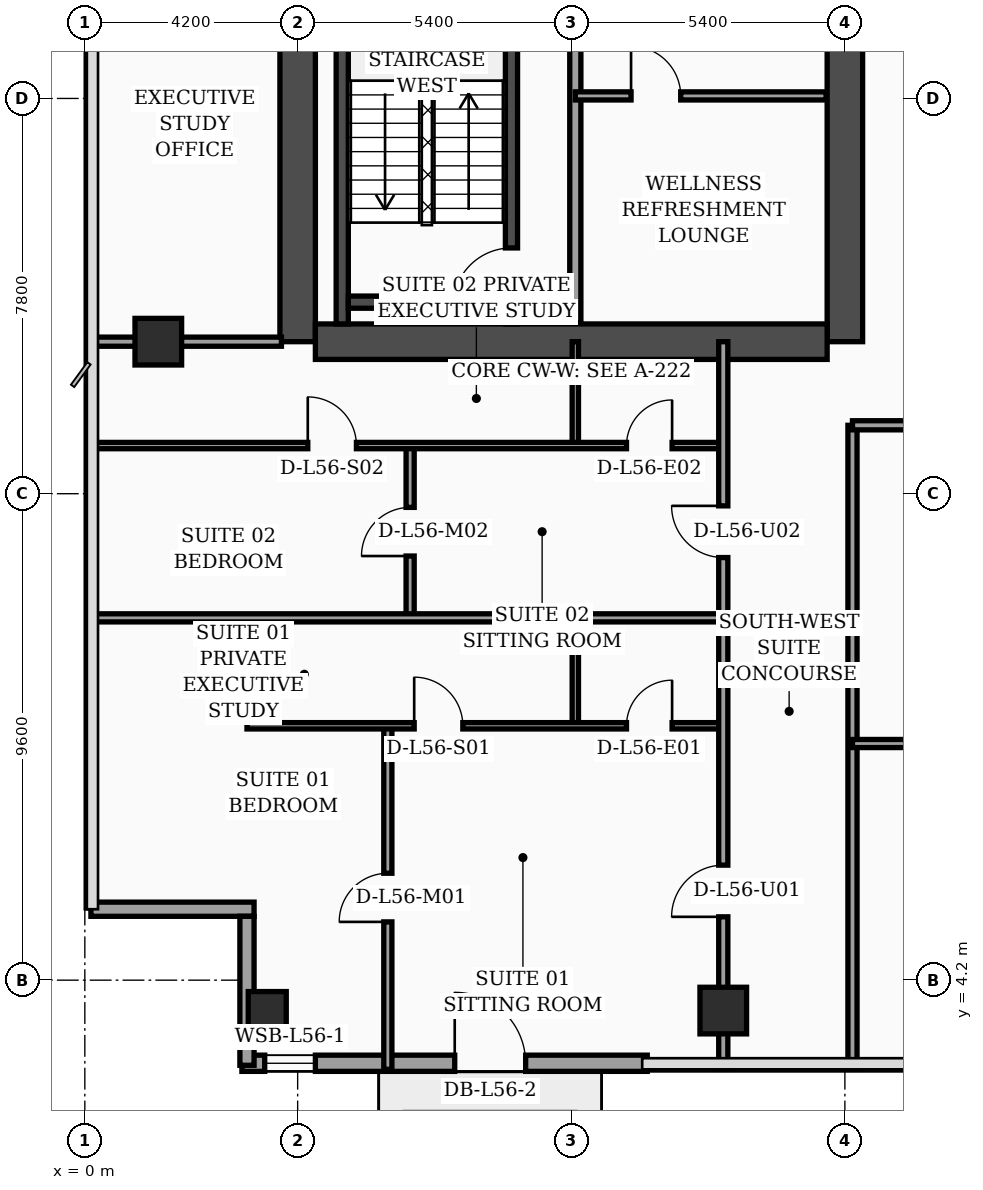
"""IFC4 building model, lengths in metres.
Left out: names, types, materials, properties, quantities, classifications, styles, units other than length and angle.
Written with IfcOpenShell. Run it as: python <this file> out.ifc"""

import sys

from ifc_helpers import new_model, si_unit, direction, frame, frame_2d, origin, origin_2d, place, context, subcontext, project, spatial, rectangle, hollow_rectangle, extrude, element, fill, save


model = new_model("IFC4")
c1 = context("Model", 3, precision=1e-05, world=origin(), true_north=direction((0.0, 1.0)))
c2 = subcontext(c1, "Body", "Model", "MODEL_VIEW")
j1 = project(units=[si_unit("LENGTHUNIT", "METRE"), si_unit("PLANEANGLEUNIT", "RADIAN")], contexts=[c1])
p1 = place(None, origin())
s1 = spatial("IfcSite", under=j1, at=p1, CompositionType="ELEMENT")
p2 = place(p1, origin())
s2 = spatial("IfcBuilding", under=s1, at=p2, CompositionType="ELEMENT")
p3 = place(p2, frame((0.0, 0.0, 226.9)))
s3 = spatial("IfcBuildingStorey", under=s2, at=p3, CompositionType="ELEMENT", Elevation=226.9)
p4 = place(p3, frame((4.2, 16.8, 0.0), z_axis=(0.0, 0.0, 1.0), x_axis=(0.0, 1.0, 0.0)))
e1 = element("IfcWall", 1, at=p4, inside=s3, PredefinedType="SHEAR", context=c2, shape_type="SweptSolid", body=[
    extrude(rectangle(XDim=21.6, YDim=0.7, at=frame_2d((10.8, 0.0))), origin(), (0.0, 0.0, 1.0), 3.56),
])
p5 = place(p3, frame((15.0, 16.8, 0.0), z_axis=(0.0, 0.0, 1.0), x_axis=(0.0, 1.0, 0.0)))
e2 = element("IfcWall", 2, at=p5, inside=s3, PredefinedType="SHEAR", context=c2, shape_type="SweptSolid", body=[
    extrude(rectangle(XDim=21.6, YDim=0.7, at=frame_2d((10.8, 0.0))), origin(), (0.0, 0.0, 1.0), 3.56),
])
p6 = place(p5, frame((8.65, 0.0, 0.0)))
e3 = element("IfcOpeningElement", 3, at=p6, cuts=e2, PredefinedType="OPENING", context=c2, shape_type="SweptSolid", body=[
    extrude(rectangle(XDim=1.1, YDim=2.2, at=frame_2d((0.55, 1.1))), frame((0.0, 0.36, 0.0), z_axis=(0.0, -1.0, 0.0), x_axis=(1.0, 0.0, 0.0)), (0.0, 0.0, 1.0), 0.72),
])
p7 = place(p5, frame((10.85, 0.0, 0.0)))
e4 = element("IfcOpeningElement", 4, at=p7, cuts=e2, PredefinedType="OPENING", context=c2, shape_type="SweptSolid", body=[
    extrude(rectangle(XDim=1.1, YDim=2.2, at=frame_2d((0.55, 1.1))), frame((0.0, 0.36, 0.0), z_axis=(0.0, -1.0, 0.0), x_axis=(1.0, 0.0, 0.0)), (0.0, 0.0, 1.0), 0.72),
])
p8 = place(p5, frame((13.5, 0.0, 0.0)))
e5 = element("IfcOpeningElement", 5, at=p8, cuts=e2, PredefinedType="OPENING", context=c2, shape_type="SweptSolid", body=[
    extrude(rectangle(XDim=1.1, YDim=2.2, at=frame_2d((0.55, 1.1))), frame((0.0, 0.36, 0.0), z_axis=(0.0, -1.0, 0.0), x_axis=(1.0, 0.0, 0.0)), (0.0, 0.0, 1.0), 0.72),
])
p9 = place(p5, frame((16.15, 0.0, 0.0)))
e6 = element("IfcOpeningElement", 6, at=p9, cuts=e2, PredefinedType="OPENING", context=c2, shape_type="SweptSolid", body=[
    extrude(rectangle(XDim=1.1, YDim=2.2, at=frame_2d((0.55, 1.1))), frame((0.0, 0.36, 0.0), z_axis=(0.0, -1.0, 0.0), x_axis=(1.0, 0.0, 0.0)), (0.0, 0.0, 1.0), 0.72),
])
p10 = place(p3, frame((4.55, 16.8, 0.0), z_axis=(0.0, 0.0, 1.0), x_axis=(1.0, 0.0, 0.0)))
e7 = element("IfcWall", 7, at=p10, inside=s3, PredefinedType="SHEAR", context=c2, shape_type="SweptSolid", body=[
    extrude(rectangle(XDim=10.1, YDim=0.7, at=frame_2d((5.05, 0.0))), origin(), (0.0, 0.0, 1.0), 3.56),
])
p11 = place(p3, frame((5.08, 17.15, 0.0), z_axis=(0.0, 0.0, 1.0), x_axis=(0.0, 1.0, 0.0)))
e8 = element("IfcWall", 8, at=p11, inside=s3, PredefinedType="SOLIDWALL", context=c2, shape_type="SweptSolid", body=[
    extrude(rectangle(XDim=9.64, YDim=0.24, at=frame_2d((4.82, 0.0))), origin(), (0.0, 0.0, 1.0), 3.56),
])
p12 = place(p3, frame((8.42, 17.15, 0.0), z_axis=(0.0, 0.0, 1.0), x_axis=(0.0, 1.0, 0.0)))
e9 = element("IfcWall", 9, at=p12, inside=s3, PredefinedType="SOLIDWALL", context=c2, shape_type="SweptSolid", body=[
    extrude(rectangle(XDim=9.64, YDim=0.24, at=frame_2d((4.82, 0.0))), origin(), (0.0, 0.0, 1.0), 3.56),
])
p13 = place(p12, frame((0.35, 0.0, 0.0)))
e10 = element("IfcOpeningElement", 10, at=p13, cuts=e9, PredefinedType="OPENING", context=c2, shape_type="SweptSolid", body=[
    extrude(rectangle(XDim=1.15, YDim=2.2, at=frame_2d((0.575, 1.1))), frame((0.0, 0.13, 0.0), z_axis=(0.0, -1.0, 0.0), x_axis=(1.0, 0.0, 0.0)), (0.0, 0.0, 1.0), 0.26),
])
p14 = place(p3, frame((5.2, 17.58, 0.0), z_axis=(0.0, 0.0, 1.0), x_axis=(1.0, 0.0, 0.0)))
e11 = element("IfcWall", 11, at=p14, inside=s3, PredefinedType="SOLIDWALL", context=c2, shape_type="SweptSolid", body=[
    extrude(rectangle(XDim=3.1, YDim=0.24, at=frame_2d((1.55, 0.0))), origin(), (0.0, 0.0, 1.0), 3.56),
])
p15 = place(p3, frame((3.6, 3.6, 0.0), z_axis=(0.0, 0.0, 1.0), x_axis=(1.0, 0.0, 0.0)))
e12 = element("IfcColumn", 12, at=p15, inside=s3, PredefinedType="COLUMN", context=c2, shape_type="SweptSolid", body=[
    extrude(hollow_rectangle(XDim=0.75, YDim=0.75, WallThickness=0.032, at=origin_2d()), origin(), (0.0, 0.0, 1.0), 3.56),
])
for number, where, z_axis, x_axis in (
    (13, (1.45, 16.8, 0.0), (0.0, 0.0, 1.0), (1.0, 0.0, 0.0)),
    (14, (12.6, 3.6, 0.0), (0.0, 0.0, 1.0), (1.0, 0.0, 0.0)),
):
    element("IfcColumn", number, at=place(p3, frame(where, z_axis=z_axis, x_axis=x_axis)), inside=s3, PredefinedType="COLUMN", context=c2, shape_type="SweptSolid", body=[
        extrude(rectangle(XDim=0.92, YDim=0.92, at=origin_2d()), origin(), (0.0, 0.0, 1.0), 3.56),
    ])
p16 = place(p3, frame((3.1, 2.56, 0.0), z_axis=(0.0, 0.0, 1.0), x_axis=(1.0, 0.0, 0.0)))
e15 = element("IfcWall", 15, at=p16, inside=s3, PredefinedType="SOLIDWALL", context=c2, shape_type="SweptSolid", body=[
    extrude(rectangle(XDim=8.0, YDim=0.32, at=frame_2d((4.0, 0.0))), origin(), (0.0, 0.0, 1.0), 3.56),
])
p17 = place(p16, frame((0.45, 0.0, 0.75)))
e16 = element("IfcOpeningElement", 16, at=p17, cuts=e15, PredefinedType="OPENING", context=c2, shape_type="SweptSolid", body=[
    extrude(rectangle(XDim=1.0, YDim=1.6, at=frame_2d((0.5, 0.8))), frame((0.0, 0.17, 0.0), z_axis=(0.0, -1.0, 0.0), x_axis=(1.0, 0.0, 0.0)), (0.0, 0.0, 1.0), 0.34),
])
p18 = place(p16, frame((4.2, 0.0, 0.0)))
e17 = element("IfcOpeningElement", 17, at=p18, cuts=e15, PredefinedType="OPENING", context=c2, shape_type="SweptSolid", body=[
    extrude(rectangle(XDim=1.4, YDim=2.25, at=frame_2d((0.7, 1.125))), frame((0.0, 0.17, 0.0), z_axis=(0.0, -1.0, 0.0), x_axis=(1.0, 0.0, 0.0)), (0.0, 0.0, 1.0), 0.34),
])
p19 = place(p3, frame((0.12, 5.6, 0.0), z_axis=(0.0, 0.0, 1.0), x_axis=(1.0, 0.0, 0.0)))
e18 = element("IfcWall", 18, at=p19, inside=s3, PredefinedType="SOLIDWALL", context=c2, shape_type="SweptSolid", body=[
    extrude(rectangle(XDim=3.22, YDim=0.28, at=frame_2d((1.61, 0.0))), origin(), (0.0, 0.0, 1.0), 2.94),
])
p20 = place(p3, frame((3.2, 5.46, 0.0), z_axis=(0.0, 0.0, 1.0), x_axis=(0.0, -1.0, 0.0)))
e19 = element("IfcWall", 19, at=p20, inside=s3, PredefinedType="SOLIDWALL", context=c2, shape_type="SweptSolid", body=[
    extrude(rectangle(XDim=2.94, YDim=0.28, at=frame_2d((1.47, 0.0))), origin(), (0.0, 0.0, 1.0), 2.94),
])
p21 = place(p3, frame((9.68, 17.17, 0.0), z_axis=(0.0, 0.0, 1.0), x_axis=(0.0, 1.0, 0.0)))
e20 = element("IfcWall", 20, at=p21, inside=s3, PredefinedType="SOLIDWALL", context=c2, shape_type="SweptSolid", body=[
    extrude(rectangle(XDim=7.83, YDim=0.22, at=frame_2d((3.915, 0.0))), origin(), (0.0, 0.0, 1.0), 3.56),
])
p22 = place(p3, frame((9.68, 21.65, 0.0), z_axis=(0.0, 0.0, 1.0), x_axis=(1.0, 0.0, 0.0)))
e21 = element("IfcWall", 21, at=p22, inside=s3, PredefinedType="PARTITIONING", context=c2, shape_type="SweptSolid", body=[
    extrude(rectangle(XDim=4.95, YDim=0.16, at=frame_2d((2.475, 0.0))), origin(), (0.0, 0.0, 1.0), 3.09),
])
p23 = place(p22, frame((1.1, 0.0, 0.0)))
e22 = element("IfcOpeningElement", 22, at=p23, cuts=e21, PredefinedType="OPENING", context=c2, shape_type="SweptSolid", body=[
    extrude(rectangle(XDim=0.98, YDim=2.15, at=frame_2d((0.49, 1.075))), frame((0.0, 0.09, 0.0), z_axis=(0.0, -1.0, 0.0), x_axis=(1.0, 0.0, 0.0)), (0.0, 0.0, 1.0), 0.18),
])
p24 = place(p3, frame((0.08, 16.8, 0.0), z_axis=(0.0, 0.0, 1.0), x_axis=(1.0, 0.0, 0.0)))
e23 = element("IfcWall", 23, at=p24, inside=s3, PredefinedType="PARTITIONING", context=c2, shape_type="SweptSolid", body=[
    extrude(rectangle(XDim=3.8, YDim=0.18, at=frame_2d((1.9, 0.0))), origin(), (0.0, 0.0, 1.0), 2.94),
])
p25 = place(p3, frame((9.68, 9.22, 0.0), z_axis=(0.0, 0.0, 1.0), x_axis=(0.0, 1.0, 0.0)))
e24 = element("IfcWall", 24, at=p25, inside=s3, PredefinedType="PARTITIONING", context=c2, shape_type="SweptSolid", body=[
    extrude(rectangle(XDim=2.13, YDim=0.125, at=frame_2d((1.065, 0.0))), origin(), (0.0, 0.0, 1.0), 3.09),
])
p26 = place(p3, frame((5.98, 2.44, 0.0), z_axis=(0.0, 0.0, 1.0), x_axis=(0.0, 1.0, 0.0)))
e25 = element("IfcWall", 25, at=p26, inside=s3, PredefinedType="PARTITIONING", context=c2, shape_type="SweptSolid", body=[
    extrude(rectangle(XDim=6.78, YDim=0.16, at=frame_2d((3.39, 0.0))), origin(), (0.0, 0.0, 1.0), 3.09),
])
p27 = place(p26, frame((2.91, 0.0, 0.0)))
e26 = element("IfcOpeningElement", 26, at=p27, cuts=e25, PredefinedType="OPENING", context=c2, shape_type="SweptSolid", body=[
    extrude(rectangle(XDim=0.96, YDim=2.2, at=frame_2d((0.48, 1.1))), frame((0.0, 0.09, 0.0), z_axis=(0.0, -1.0, 0.0), x_axis=(1.0, 0.0, 0.0)), (0.0, 0.0, 1.0), 0.18),
])
p28 = place(p3, frame((3.2, 9.22, 0.0), z_axis=(0.0, 0.0, 1.0), x_axis=(1.0, 0.0, 0.0)))
e27 = element("IfcWall", 27, at=p28, inside=s3, PredefinedType="PARTITIONING", context=c2, shape_type="SweptSolid", body=[
    extrude(rectangle(XDim=9.4, YDim=0.125, at=frame_2d((4.7, 0.0))), origin(), (0.0, 0.0, 1.0), 2.94),
])
p29 = place(p28, frame((3.3, 0.0, 0.0)))
e28 = element("IfcOpeningElement", 28, at=p29, cuts=e27, PredefinedType="OPENING", context=c2, shape_type="SweptSolid", body=[
    extrude(rectangle(XDim=0.96, YDim=2.2, at=frame_2d((0.48, 1.1))), frame((0.0, 0.073, 0.0), z_axis=(0.0, -1.0, 0.0), x_axis=(1.0, 0.0, 0.0)), (0.0, 0.0, 1.0), 0.145),
])
p30 = place(p28, frame((7.49, 0.0, 0.0)))
e29 = element("IfcOpeningElement", 29, at=p30, cuts=e27, PredefinedType="OPENING", context=c2, shape_type="SweptSolid", body=[
    extrude(rectangle(XDim=0.9, YDim=2.15, at=frame_2d((0.45, 1.075))), frame((0.0, 0.073, 0.0), z_axis=(0.0, -1.0, 0.0), x_axis=(1.0, 0.0, 0.0)), (0.0, 0.0, 1.0), 0.145),
])
p31 = place(p3, frame((9.68, 14.75, 0.0), z_axis=(0.0, 0.0, 1.0), x_axis=(0.0, 1.0, 0.0)))
e30 = element("IfcWall", 30, at=p31, inside=s3, PredefinedType="PARTITIONING", context=c2, shape_type="SweptSolid", body=[
    extrude(rectangle(XDim=2.05, YDim=0.125, at=frame_2d((1.025, 0.0))), origin(), (0.0, 0.0, 1.0), 3.56),
])
p32 = place(p3, frame((6.42, 11.35, 0.0), z_axis=(0.0, 0.0, 1.0), x_axis=(0.0, 1.0, 0.0)))
e31 = element("IfcWall", 31, at=p32, inside=s3, PredefinedType="PARTITIONING", context=c2, shape_type="SweptSolid", body=[
    extrude(rectangle(XDim=3.4, YDim=0.16, at=frame_2d((1.7, 0.0))), origin(), (0.0, 0.0, 1.0), 3.56),
])
p33 = place(p32, frame((1.22, 0.0, 0.0)))
e32 = element("IfcOpeningElement", 32, at=p33, cuts=e31, PredefinedType="OPENING", context=c2, shape_type="SweptSolid", body=[
    extrude(rectangle(XDim=0.96, YDim=2.2, at=frame_2d((0.48, 1.1))), frame((0.0, 0.09, 0.0), z_axis=(0.0, -1.0, 0.0), x_axis=(1.0, 0.0, 0.0)), (0.0, 0.0, 1.0), 0.18),
])
p34 = place(p3, frame((0.08, 14.75, 0.0), z_axis=(0.0, 0.0, 1.0), x_axis=(1.0, 0.0, 0.0)))
e33 = element("IfcWall", 33, at=p34, inside=s3, PredefinedType="PARTITIONING", context=c2, shape_type="SweptSolid", body=[
    extrude(rectangle(XDim=12.52, YDim=0.125, at=frame_2d((6.26, 0.0))), origin(), (0.0, 0.0, 1.0), 2.94),
])
p35 = place(p34, frame((4.32, 0.0, 0.0)))
e34 = element("IfcOpeningElement", 34, at=p35, cuts=e33, PredefinedType="OPENING", context=c2, shape_type="SweptSolid", body=[
    extrude(rectangle(XDim=0.96, YDim=2.2, at=frame_2d((0.48, 1.1))), frame((0.0, 0.073, 0.0), z_axis=(0.0, -1.0, 0.0), x_axis=(1.0, 0.0, 0.0)), (0.0, 0.0, 1.0), 0.145),
])
p36 = place(p34, frame((10.61, 0.0, 0.0)))
e35 = element("IfcOpeningElement", 35, at=p36, cuts=e33, PredefinedType="OPENING", context=c2, shape_type="SweptSolid", body=[
    extrude(rectangle(XDim=0.9, YDim=2.15, at=frame_2d((0.45, 1.075))), frame((0.0, 0.073, 0.0), z_axis=(0.0, -1.0, 0.0), x_axis=(1.0, 0.0, 0.0)), (0.0, 0.0, 1.0), 0.145),
])
p37 = place(p3, frame((0.08, 11.35, 0.0), z_axis=(0.0, 0.0, 1.0), x_axis=(1.0, 0.0, 0.0)))
e36 = element("IfcWall", 36, at=p37, inside=s3, PredefinedType="PARTITIONING", context=c2, shape_type="SweptSolid", body=[
    extrude(rectangle(XDim=12.52, YDim=0.16, at=frame_2d((6.26, 0.0))), origin(), (0.0, 0.0, 1.0), 2.94),
])
p38 = place(p3, frame((12.6, 2.44, 0.0), z_axis=(0.0, 0.0, 1.0), x_axis=(0.0, 1.0, 0.0)))
e37 = element("IfcWall", 37, at=p38, inside=s3, PredefinedType="PARTITIONING", context=c2, shape_type="SweptSolid", body=[
    extrude(rectangle(XDim=14.36, YDim=0.18, at=frame_2d((7.18, 0.0))), origin(), (0.0, 0.0, 1.0), 2.94),
])
p39 = place(p38, frame((3.01, 0.0, 0.0)))
e38 = element("IfcOpeningElement", 38, at=p39, cuts=e37, PredefinedType="OPENING", context=c2, shape_type="SweptSolid", body=[
    extrude(rectangle(XDim=1.02, YDim=2.2, at=frame_2d((0.51, 1.1))), frame((0.0, 0.1, 0.0), z_axis=(0.0, -1.0, 0.0), x_axis=(1.0, 0.0, 0.0)), (0.0, 0.0, 1.0), 0.2),
])
p40 = place(p38, frame((10.1, 0.0, 0.0)))
e39 = element("IfcOpeningElement", 39, at=p40, cuts=e37, PredefinedType="OPENING", context=c2, shape_type="SweptSolid", body=[
    extrude(rectangle(XDim=1.02, YDim=2.2, at=frame_2d((0.51, 1.1))), frame((0.0, 0.1, 0.0), z_axis=(0.0, -1.0, 0.0), x_axis=(1.0, 0.0, 0.0)), (0.0, 0.0, 1.0), 0.2),
])
p41 = place(p3, frame((15.15, 2.44, 0.0), z_axis=(0.0, 0.0, 1.0), x_axis=(0.0, 1.0, 0.0)))
e40 = element("IfcWall", 40, at=p41, inside=s3, PredefinedType="PARTITIONING", context=c2, shape_type="SweptSolid", body=[
    extrude(rectangle(XDim=12.71, YDim=0.18, at=frame_2d((6.355, 0.0))), origin(), (0.0, 0.0, 1.0), 3.09),
])
p42 = place(p3, frame((15.15, 8.87, 0.0), z_axis=(0.0, 0.0, 1.0), x_axis=(1.0, 0.0, 0.0)))
e41 = element("IfcWall", 41, at=p42, inside=s3, PredefinedType="PARTITIONING", context=c2, shape_type="SweptSolid", body=[
    extrude(rectangle(XDim=4.45, YDim=0.16, at=frame_2d((2.225, 0.0))), origin(), (0.0, 0.0, 1.0), 3.56),
])
p43 = place(p42, frame((1.75, 0.0, 0.0)))
e42 = element("IfcOpeningElement", 42, at=p43, cuts=e41, PredefinedType="OPENING", context=c2, shape_type="SweptSolid", body=[
    extrude(rectangle(XDim=0.96, YDim=2.2, at=frame_2d((0.48, 1.1))), frame((0.0, 0.09, 0.0), z_axis=(0.0, -1.0, 0.0), x_axis=(1.0, 0.0, 0.0)), (0.0, 0.0, 1.0), 0.18),
])
p44 = place(p3, frame((15.15, 15.15, 0.0), z_axis=(0.0, 0.0, 1.0), x_axis=(1.0, 0.0, 0.0)))
e43 = element("IfcWall", 43, at=p44, inside=s3, PredefinedType="PARTITIONING", context=c2, shape_type="SweptSolid", body=[
    extrude(rectangle(XDim=6.45, YDim=0.18, at=frame_2d((3.225, 0.0))), origin(), (0.0, 0.0, 1.0), 2.59),
])
p45 = place(p44, frame((1.74, 0.0, 0.0)))
e44 = element("IfcOpeningElement", 44, at=p45, cuts=e43, PredefinedType="OPENING", context=c2, shape_type="SweptSolid", body=[
    extrude(rectangle(XDim=1.02, YDim=2.2, at=frame_2d((0.51, 1.1))), frame((0.0, 0.1, 0.0), z_axis=(0.0, -1.0, 0.0), x_axis=(1.0, 0.0, 0.0)), (0.0, 0.0, 1.0), 0.2),
])
p46 = place(p17, origin())
e45 = element("IfcWindow", 45, at=p46, inside=s3, PartitioningType="SINGLE_PANEL", PredefinedType="WINDOW", context=c2, shape_type="SweptSolid", body=[
    extrude(rectangle(XDim=1.0, YDim=1.6, at=frame_2d((0.5, 0.8))), frame((0.0, 0.03, 0.0), z_axis=(0.0, -1.0, 0.0), x_axis=(1.0, 0.0, 0.0)), (0.0, 0.0, 1.0), 0.06),
])
fill(e16, e45)
p47 = place(p18, origin())
e46 = element("IfcDoor", 46, at=p47, inside=s3, OperationType="SINGLE_SWING_LEFT", PredefinedType="DOOR", context=c2, shape_type="SweptSolid", body=[
    extrude(rectangle(XDim=1.4, YDim=2.25, at=frame_2d((0.7, 1.125))), frame((0.0, 0.025, 0.0), z_axis=(0.0, -1.0, 0.0), x_axis=(1.0, 0.0, 0.0)), (0.0, 0.0, 1.0), 0.05),
])
fill(e17, e46)
p48 = place(p23, origin())
e47 = element("IfcDoor", 47, at=p48, inside=s3, OperationType="SINGLE_SWING_LEFT", PredefinedType="DOOR", context=c2, shape_type="SweptSolid", body=[
    extrude(rectangle(XDim=0.98, YDim=2.15, at=frame_2d((0.49, 1.075))), frame((0.0, 0.025, 0.0), z_axis=(0.0, -1.0, 0.0), x_axis=(1.0, 0.0, 0.0)), (0.0, 0.0, 1.0), 0.05),
])
fill(e22, e47)
p49 = place(p27, origin())
e48 = element("IfcDoor", 48, at=p49, inside=s3, OperationType="SINGLE_SWING_LEFT", PredefinedType="DOOR", context=c2, shape_type="SweptSolid", body=[
    extrude(rectangle(XDim=0.96, YDim=2.2, at=frame_2d((0.48, 1.1))), frame((0.0, 0.025, 0.0), z_axis=(0.0, -1.0, 0.0), x_axis=(1.0, 0.0, 0.0)), (0.0, 0.0, 1.0), 0.05),
])
fill(e26, e48)
p50 = place(p29, origin())
e49 = element("IfcDoor", 49, at=p50, inside=s3, OperationType="SINGLE_SWING_LEFT", PredefinedType="DOOR", context=c2, shape_type="SweptSolid", body=[
    extrude(rectangle(XDim=0.96, YDim=2.2, at=frame_2d((0.48, 1.1))), frame((0.0, 0.025, 0.0), z_axis=(0.0, -1.0, 0.0), x_axis=(1.0, 0.0, 0.0)), (0.0, 0.0, 1.0), 0.05),
])
fill(e28, e49)
p51 = place(p30, origin())
e50 = element("IfcDoor", 50, at=p51, inside=s3, OperationType="SINGLE_SWING_RIGHT", PredefinedType="DOOR", context=c2, shape_type="SweptSolid", body=[
    extrude(rectangle(XDim=0.9, YDim=2.15, at=frame_2d((0.45, 1.075))), frame((0.0, 0.025, 0.0), z_axis=(0.0, -1.0, 0.0), x_axis=(1.0, 0.0, 0.0)), (0.0, 0.0, 1.0), 0.05),
])
fill(e29, e50)
p52 = place(p33, origin())
e51 = element("IfcDoor", 51, at=p52, inside=s3, OperationType="SINGLE_SWING_LEFT", PredefinedType="DOOR", context=c2, shape_type="SweptSolid", body=[
    extrude(rectangle(XDim=0.96, YDim=2.2, at=frame_2d((0.48, 1.1))), frame((0.0, 0.025, 0.0), z_axis=(0.0, -1.0, 0.0), x_axis=(1.0, 0.0, 0.0)), (0.0, 0.0, 1.0), 0.05),
])
fill(e32, e51)
p53 = place(p35, origin())
e52 = element("IfcDoor", 52, at=p53, inside=s3, OperationType="SINGLE_SWING_LEFT", PredefinedType="DOOR", context=c2, shape_type="SweptSolid", body=[
    extrude(rectangle(XDim=0.96, YDim=2.2, at=frame_2d((0.48, 1.1))), frame((0.0, 0.025, 0.0), z_axis=(0.0, -1.0, 0.0), x_axis=(1.0, 0.0, 0.0)), (0.0, 0.0, 1.0), 0.05),
])
fill(e34, e52)
p54 = place(p36, origin())
e53 = element("IfcDoor", 53, at=p54, inside=s3, OperationType="SINGLE_SWING_RIGHT", PredefinedType="DOOR", context=c2, shape_type="SweptSolid", body=[
    extrude(rectangle(XDim=0.9, YDim=2.15, at=frame_2d((0.45, 1.075))), frame((0.0, 0.025, 0.0), z_axis=(0.0, -1.0, 0.0), x_axis=(1.0, 0.0, 0.0)), (0.0, 0.0, 1.0), 0.05),
])
fill(e35, e53)
p55 = place(p39, origin())
e54 = element("IfcDoor", 54, at=p55, inside=s3, OperationType="SINGLE_SWING_LEFT", PredefinedType="DOOR", context=c2, shape_type="SweptSolid", body=[
    extrude(rectangle(XDim=1.02, YDim=2.2, at=frame_2d((0.51, 1.1))), frame((0.0, 0.025, 0.0), z_axis=(0.0, -1.0, 0.0), x_axis=(1.0, 0.0, 0.0)), (0.0, 0.0, 1.0), 0.05),
])
fill(e38, e54)
p56 = place(p40, origin())
e55 = element("IfcDoor", 55, at=p56, inside=s3, OperationType="SINGLE_SWING_RIGHT", PredefinedType="DOOR", context=c2, shape_type="SweptSolid", body=[
    extrude(rectangle(XDim=1.02, YDim=2.2, at=frame_2d((0.51, 1.1))), frame((0.0, 0.025, 0.0), z_axis=(0.0, -1.0, 0.0), x_axis=(1.0, 0.0, 0.0)), (0.0, 0.0, 1.0), 0.05),
])
fill(e39, e55)
p57 = place(p13, origin())
e56 = element("IfcDoor", 56, at=p57, inside=s3, OperationType="SINGLE_SWING_LEFT", PredefinedType="DOOR", context=c2, shape_type="SweptSolid", body=[
    extrude(rectangle(XDim=1.15, YDim=2.2, at=frame_2d((0.575, 1.1))), frame((0.0, 0.025, 0.0), z_axis=(0.0, -1.0, 0.0), x_axis=(1.0, 0.0, 0.0)), (0.0, 0.0, 1.0), 0.05),
])
fill(e10, e56)
save(model, sys.argv[1])
